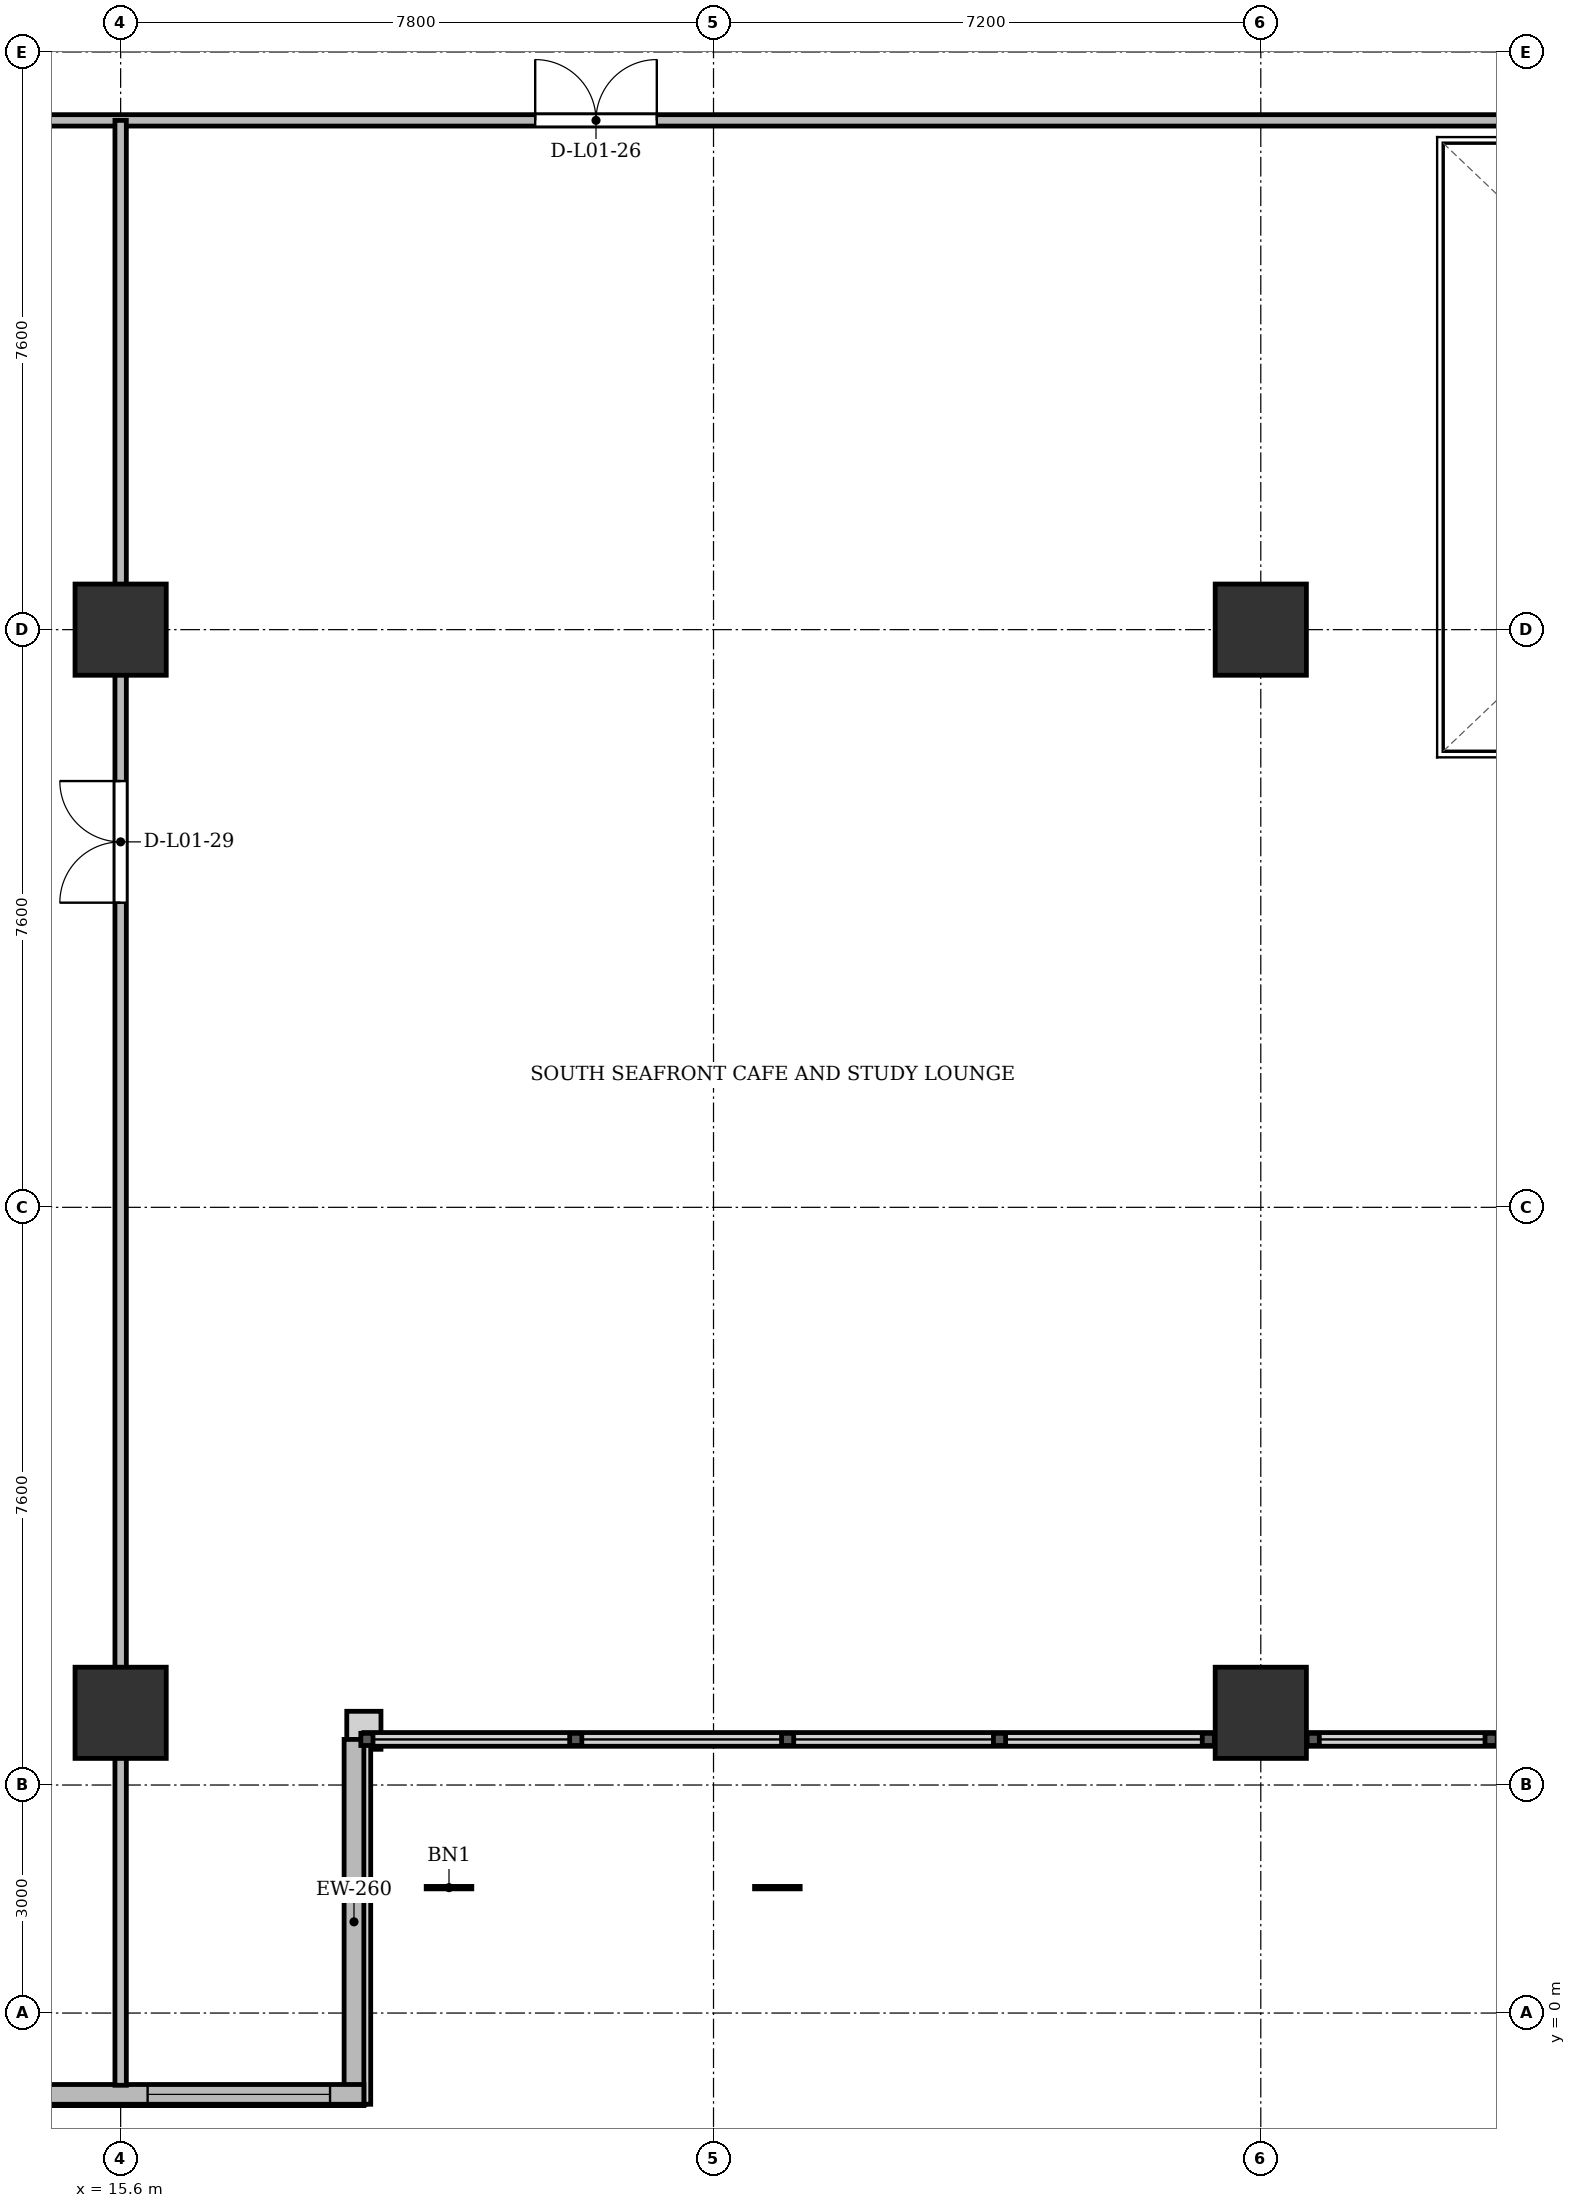
"""IFC4 building model, lengths in metres.
Left out: names, types, materials, properties, quantities, classifications, styles, units other than length and angle.
Written with IfcOpenShell. Run it as: python <this file> out.ifc"""

import sys

from ifc_helpers import new_model, si_unit, direction, frame, frame_2d, origin, origin_2d, place, context, subcontext, project, spatial, rectangle, extrude, source, transform, mapped, element, fill, save


model = new_model("IFC4")
c1 = context("Model", 3, precision=1e-05, world=origin(), true_north=direction((0.0, 1.0)))
c2 = subcontext(c1, "Body", "Model", "MODEL_VIEW")
j1 = project(units=[si_unit("LENGTHUNIT", "METRE"), si_unit("PLANEANGLEUNIT", "RADIAN")], contexts=[c1])
p1 = place(None, origin())
s1 = spatial("IfcSite", under=j1, at=p1, CompositionType="ELEMENT")
p2 = place(p1, origin())
s2 = spatial("IfcBuilding", under=s1, at=p2, CompositionType="ELEMENT")
p3 = place(p2, frame((0.0, 0.0, 5.2)))
s3 = spatial("IfcBuildingStorey", under=s2, at=p3, CompositionType="ELEMENT", Elevation=5.2)
m1 = source(origin(), c2, "Body", "SweptSolid", [
    extrude(rectangle(XDim=1.2, YDim=1.2, at=origin_2d()), origin(), (0.0, 0.0, 1.0), 4.5),
])
for number, where, z_axis, x_axis in (
    (1, (15.6, 3.95, 0.0), (0.0, 0.0, 1.0), (1.0, 0.0, 0.0)),
    (2, (15.6, 18.2, 0.0), (0.0, 0.0, 1.0), (1.0, 0.0, 0.0)),
    (3, (30.6, 3.95, 0.0), (0.0, 0.0, 1.0), (1.0, 0.0, 0.0)),
    (4, (30.6, 18.2, 0.0), (0.0, 0.0, 1.0), (1.0, 0.0, 0.0)),
):
    element("IfcColumn", number, at=place(p3, frame(where, z_axis=z_axis, x_axis=x_axis)), inside=s3, PredefinedType="COLUMN", context=c2, shape_type="MappedRepresentation", body=[
        mapped(m1, transform((0.0, 0.0, 0.0), x_axis=(1.0, 0.0, 0.0), y_axis=(0.0, 1.0, 0.0), z_axis=(0.0, 0.0, 1.0), scale=1.0)),
    ])
p4 = place(p3, frame((18.67, 3.6, 0.0), z_axis=(0.0, 0.0, 1.0), x_axis=(0.0, -1.0, 0.0)))
e5 = element("IfcWall", 5, at=p4, inside=s3, PredefinedType="SOLIDWALL", context=c2, shape_type="SweptSolid", body=[
    extrude(rectangle(XDim=4.8, YDim=0.26, at=frame_2d((2.4, 0.0))), origin(), (0.0, 0.0, 1.0), 4.2),
])
p5 = place(p3, frame((18.8, -1.07, 0.0), z_axis=(0.0, 0.0, 1.0), x_axis=(-1.0, 0.0, 0.0)))
e6 = element("IfcWall", 6, at=p5, inside=s3, PredefinedType="SOLIDWALL", context=c2, shape_type="SweptSolid", body=[
    extrude(rectangle(XDim=22.0, YDim=0.26, at=frame_2d((11.0, 0.0))), origin(), (0.0, 0.0, 1.0), 4.2),
])
p6 = place(p5, frame((0.445, 0.0, 0.9)))
e7 = element("IfcOpeningElement", 7, at=p6, cuts=e6, PredefinedType="OPENING", context=c2, shape_type="SweptSolid", body=[
    extrude(rectangle(XDim=2.4, YDim=2.1, at=frame_2d((1.2, 1.05))), frame((0.0, 0.14, 0.0), z_axis=(0.0, -1.0, 0.0), x_axis=(1.0, 0.0, 0.0)), (0.0, 0.0, 1.0), 0.28),
])
p7 = place(p5, frame((11.255, 0.0, 0.9)))
e8 = element("IfcOpeningElement", 8, at=p7, cuts=e6, PredefinedType="OPENING", context=c2, shape_type="SweptSolid", body=[
    extrude(rectangle(XDim=2.6, YDim=1.9, at=frame_2d((1.3, 0.95))), frame((0.0, 0.14, 0.0), z_axis=(0.0, -1.0, 0.0), x_axis=(1.0, 0.0, 0.0)), (0.0, 0.0, 1.0), 0.28),
])
p8 = place(p3, frame((-2.95, 24.9, 0.0), z_axis=(0.0, 0.0, 1.0), x_axis=(1.0, 0.0, 0.0)))
e9 = element("IfcWall", 9, at=p8, inside=s3, PredefinedType="PARTITIONING", context=c2, shape_type="SweptSolid", body=[
    extrude(rectangle(XDim=80.3, YDim=0.15, at=frame_2d((40.15, 0.0))), origin(), (0.0, 0.0, 1.0), 3.4),
])
p9 = place(p8, frame((2.484, 0.0, 0.0)))
e10 = element("IfcOpeningElement", 10, at=p9, cuts=e9, PredefinedType="OPENING", context=c2, shape_type="SweptSolid", body=[
    extrude(rectangle(XDim=1.6, YDim=2.2, at=frame_2d((0.8, 1.1))), frame((0.0, 0.085, 0.0), z_axis=(0.0, -1.0, 0.0), x_axis=(1.0, 0.0, 0.0)), (0.0, 0.0, 1.0), 0.17),
])
p10 = place(p8, frame((24.004, 0.0, 0.0)))
e11 = element("IfcOpeningElement", 11, at=p10, cuts=e9, PredefinedType="OPENING", context=c2, shape_type="SweptSolid", body=[
    extrude(rectangle(XDim=1.6, YDim=2.2, at=frame_2d((0.8, 1.1))), frame((0.0, 0.085, 0.0), z_axis=(0.0, -1.0, 0.0), x_axis=(1.0, 0.0, 0.0)), (0.0, 0.0, 1.0), 0.17),
])
p11 = place(p8, frame((54.877, 0.0, 0.0)))
e12 = element("IfcOpeningElement", 12, at=p11, cuts=e9, PredefinedType="OPENING", context=c2, shape_type="SweptSolid", body=[
    extrude(rectangle(XDim=1.6, YDim=2.2, at=frame_2d((0.8, 1.1))), frame((0.0, 0.085, 0.0), z_axis=(0.0, -1.0, 0.0), x_axis=(1.0, 0.0, 0.0)), (0.0, 0.0, 1.0), 0.17),
])
p12 = place(p8, frame((76.577, 0.0, 0.0)))
e13 = element("IfcOpeningElement", 13, at=p12, cuts=e9, PredefinedType="OPENING", context=c2, shape_type="SweptSolid", body=[
    extrude(rectangle(XDim=1.6, YDim=2.2, at=frame_2d((0.8, 1.1))), frame((0.0, 0.085, 0.0), z_axis=(0.0, -1.0, 0.0), x_axis=(1.0, 0.0, 0.0)), (0.0, 0.0, 1.0), 0.17),
])
p13 = place(p3, frame((15.6, -0.95, 0.0), z_axis=(0.0, 0.0, 1.0), x_axis=(0.0, 1.0, 0.0)))
e14 = element("IfcWall", 14, at=p13, inside=s3, PredefinedType="PARTITIONING", context=c2, shape_type="SweptSolid", body=[
    extrude(rectangle(XDim=25.85, YDim=0.15, at=frame_2d((12.925, 0.0))), origin(), (0.0, 0.0, 1.0), 3.4),
])
p14 = place(p13, frame((15.558, 0.0, 0.0)))
e15 = element("IfcOpeningElement", 15, at=p14, cuts=e14, PredefinedType="OPENING", context=c2, shape_type="SweptSolid", body=[
    extrude(rectangle(XDim=1.6, YDim=2.2, at=frame_2d((0.8, 1.1))), frame((0.0, 0.085, 0.0), z_axis=(0.0, -1.0, 0.0), x_axis=(1.0, 0.0, 0.0)), (0.0, 0.0, 1.0), 0.17),
])
m2 = source(origin(), c2, "Body", "SweptSolid", [
    extrude(rectangle(XDim=2.4, YDim=2.1, at=frame_2d((1.2, 1.05))), frame((0.0, 0.03, 0.0), z_axis=(0.0, -1.0, 0.0), x_axis=(1.0, 0.0, 0.0)), (0.0, 0.0, 1.0), 0.06),
])
p15 = place(p6, origin())
e16 = element("IfcWindow", 16, at=p15, inside=s3, PartitioningType="SINGLE_PANEL", PredefinedType="WINDOW", context=c2, shape_type="MappedRepresentation", body=[
    mapped(m2, transform((0.0, 0.0, 0.0), x_axis=(1.0, 0.0, 0.0), y_axis=(0.0, 1.0, 0.0), z_axis=(0.0, 0.0, 1.0), scale=1.0)),
])
fill(e7, e16)
m3 = source(origin(), c2, "Body", "SweptSolid", [
    extrude(rectangle(XDim=1.6, YDim=2.2, at=frame_2d((0.8, 1.1))), frame((0.0, 0.025, 0.0), z_axis=(0.0, -1.0, 0.0), x_axis=(1.0, 0.0, 0.0)), (0.0, 0.0, 1.0), 0.05),
])
p16 = place(p10, origin())
e17 = element("IfcDoor", 17, at=p16, inside=s3, OperationType="DOUBLE_DOOR_SINGLE_SWING", PredefinedType="DOOR", context=c2, shape_type="MappedRepresentation", body=[
    mapped(m3, transform((0.0, 0.0, 0.0), x_axis=(1.0, 0.0, 0.0), y_axis=(0.0, 1.0, 0.0), z_axis=(0.0, 0.0, 1.0), scale=1.0)),
])
fill(e11, e17)
p17 = place(p14, origin())
e18 = element("IfcDoor", 18, at=p17, inside=s3, OperationType="DOUBLE_DOOR_SINGLE_SWING", PredefinedType="DOOR", context=c2, shape_type="MappedRepresentation", body=[
    mapped(m3, transform((0.0, 0.0, 0.0), x_axis=(1.0, 0.0, 0.0), y_axis=(0.0, 1.0, 0.0), z_axis=(0.0, 0.0, 1.0), scale=1.0)),
])
fill(e15, e18)
save(model, sys.argv[1])
